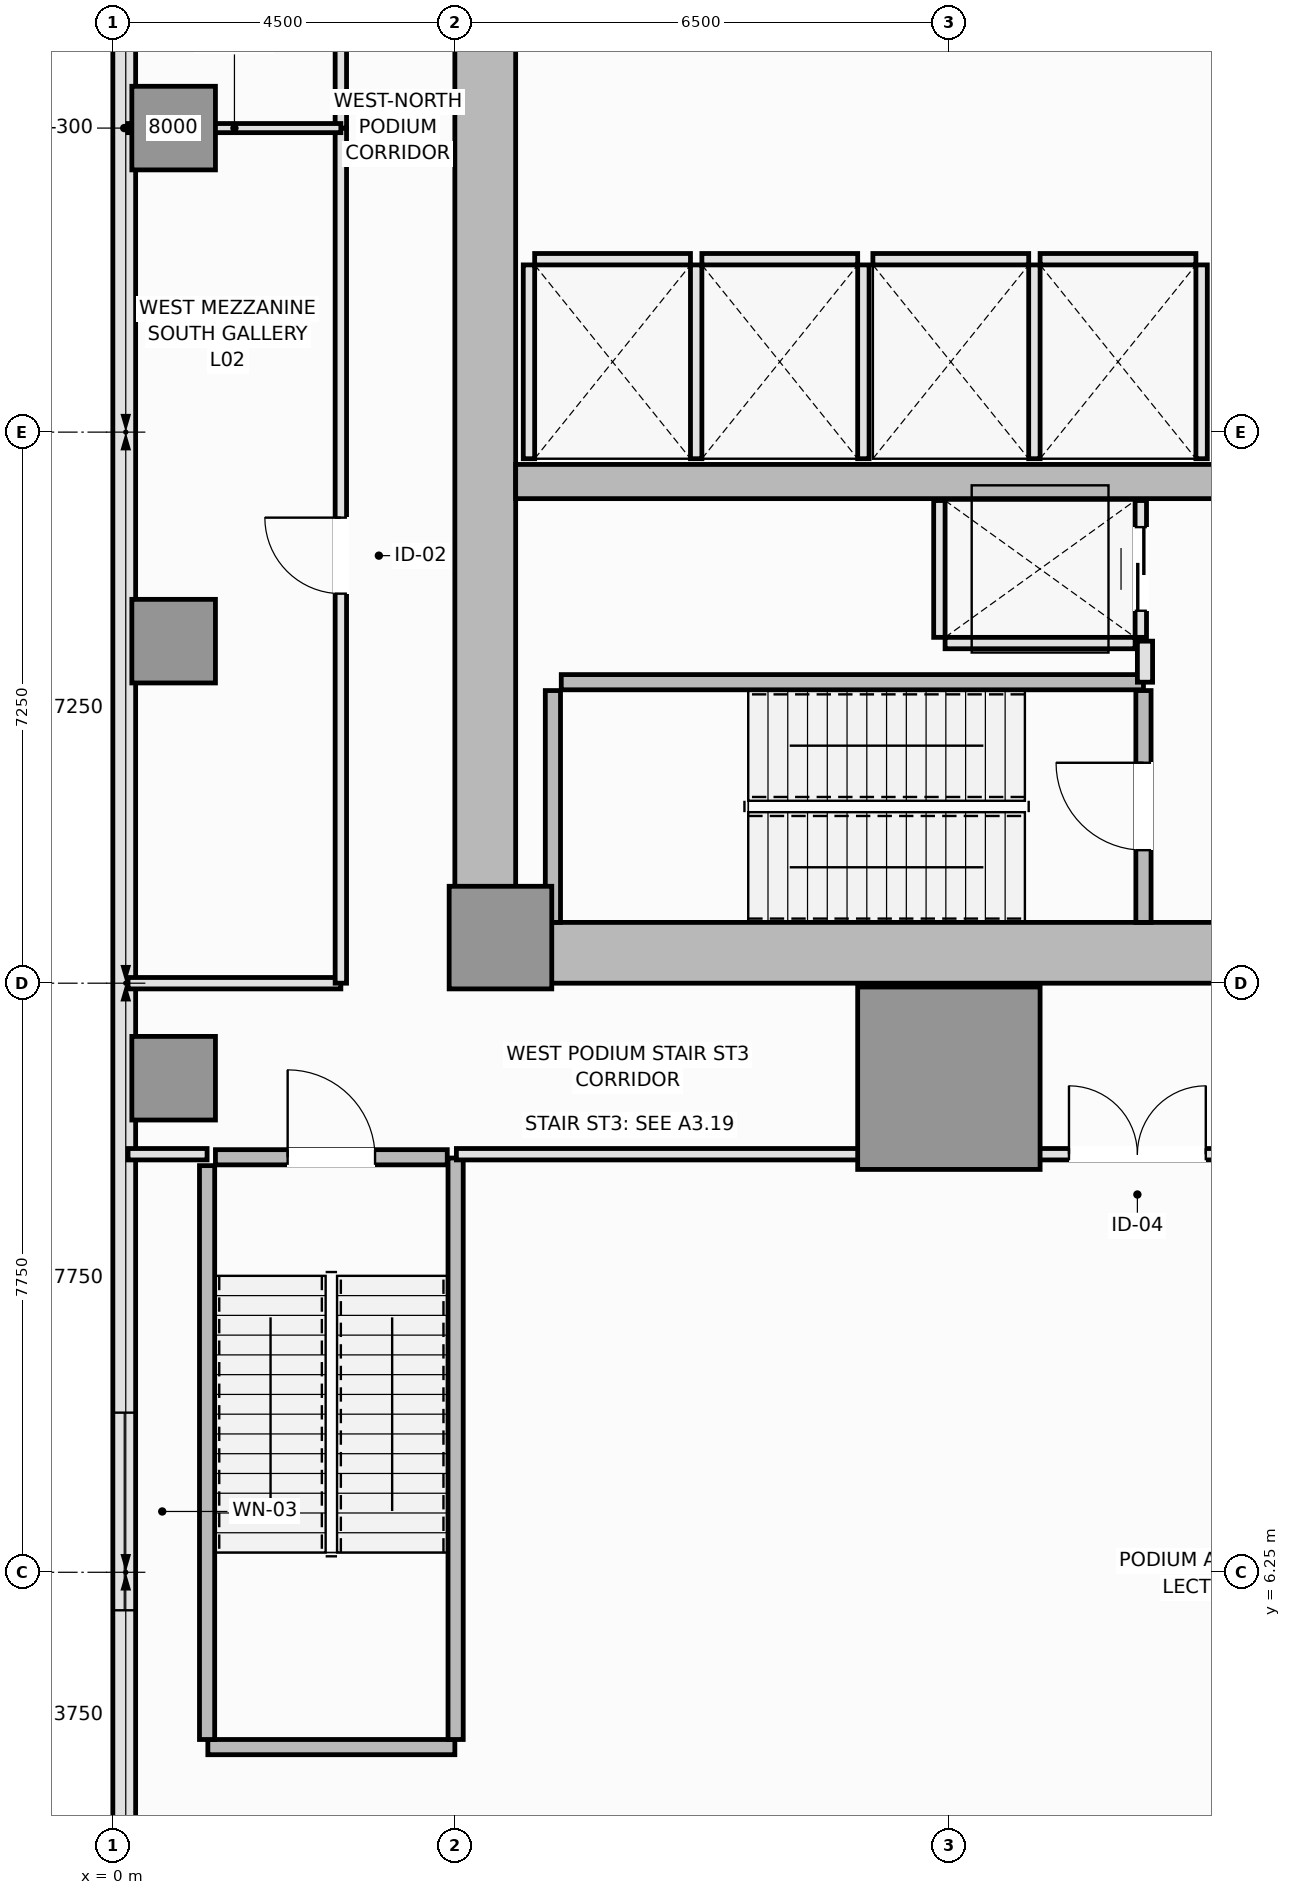
"""IFC4 building model, lengths in metres.
Left out: names, types, materials, properties, quantities, classifications, styles, units other than length and angle.
Written with IfcOpenShell. Run it as: python <this file> out.ifc"""

import sys

from ifc_helpers import new_model, si_unit, direction, frame, frame_2d, origin, origin_2d, place, context, subcontext, project, spatial, rectangle, extrude, element, fill, save


model = new_model("IFC4")
c1 = context("Model", 3, precision=1e-05, world=origin(), true_north=direction((0.0, 1.0)))
c2 = subcontext(c1, "Body", "Model", "MODEL_VIEW")
j1 = project(units=[si_unit("LENGTHUNIT", "METRE"), si_unit("PLANEANGLEUNIT", "RADIAN")], contexts=[c1])
p1 = place(None, origin())
s1 = spatial("IfcSite", under=j1, at=p1, CompositionType="ELEMENT")
p2 = place(p1, origin())
s2 = spatial("IfcBuilding", under=s1, at=p2, CompositionType="ELEMENT")
p3 = place(p2, frame((0.0, 0.0, 10.8)))
s3 = spatial("IfcBuildingStorey", under=s2, at=p3, CompositionType="ELEMENT", Elevation=10.8)
p4 = place(p3, frame((4.5, 14.4, 0.0), z_axis=(0.0, 0.0, 1.0), x_axis=(1.0, 0.0, 0.0)))
e1 = element("IfcWall", 1, at=p4, inside=s3, PredefinedType="SHEAR", context=c2, shape_type="SweptSolid", body=[
    extrude(rectangle(XDim=13.5, YDim=0.8, at=frame_2d((6.75, 0.0))), origin(), (0.0, 0.0, 1.0), 4.8),
])
p5 = place(p3, frame((4.9, 14.8, 0.0), z_axis=(0.0, 0.0, 1.0), x_axis=(0.0, 1.0, 0.0)))
e2 = element("IfcWall", 2, at=p5, inside=s3, PredefinedType="SHEAR", context=c2, shape_type="SweptSolid", body=[
    extrude(rectangle(XDim=20.9, YDim=0.8, at=frame_2d((10.45, 0.0))), origin(), (0.0, 0.0, 1.0), 4.8),
])
p6 = place(p3, frame((5.3, 20.6, 0.0), z_axis=(0.0, 0.0, 1.0), x_axis=(1.0, 0.0, 0.0)))
e3 = element("IfcWall", 3, at=p6, inside=s3, PredefinedType="SHEAR", context=c2, shape_type="SweptSolid", body=[
    extrude(rectangle(XDim=11.9, YDim=0.45, at=frame_2d((5.95, 0.0))), origin(), (0.0, 0.0, 1.0), 4.8),
])
p7 = place(p3, frame((5.1, 14.6, 0.0), z_axis=(0.0, 0.0, 1.0), x_axis=(1.0, 0.0, 0.0)))
e4 = element("IfcColumn", 4, at=p7, inside=s3, PredefinedType="PILASTER", context=c2, shape_type="SweptSolid", body=[
    extrude(rectangle(XDim=1.35, YDim=1.35, at=origin_2d()), origin(), (0.0, 0.0, 1.0), 4.8),
])
p8 = place(p3, frame((11.0, 12.75, 0.0), z_axis=(0.0, 0.0, 1.0), x_axis=(1.0, 0.0, 0.0)))
e5 = element("IfcColumn", 5, at=p8, inside=s3, PredefinedType="COLUMN", context=c2, shape_type="SweptSolid", body=[
    extrude(rectangle(XDim=2.4, YDim=2.4, at=origin_2d()), origin(), (0.0, 0.0, 1.0), 4.8),
])
for number, where, z_axis, x_axis in (
    (6, (0.8, 12.75, 0.0), (0.0, 0.0, 1.0), (1.0, 0.0, 0.0)),
    (7, (0.8, 18.5, 0.0), (0.0, 0.0, 1.0), (1.0, 0.0, 0.0)),
    (8, (0.8, 25.25, 0.0), (0.0, 0.0, 1.0), (1.0, 0.0, 0.0)),
):
    element("IfcColumn", number, at=place(p3, frame(where, z_axis=z_axis, x_axis=x_axis)), inside=s3, PredefinedType="COLUMN", context=c2, shape_type="SweptSolid", body=[
        extrude(rectangle(XDim=1.1, YDim=1.1, at=origin_2d()), origin(), (0.0, 0.0, 1.0), 4.8),
    ])
p9 = place(p3, frame((0.15, 50.35, 0.0), z_axis=(0.0, 0.0, 1.0), x_axis=(0.0, -1.0, 0.0)))
e9 = element("IfcWall", 9, at=p9, inside=s3, PredefinedType="SOLIDWALL", context=c2, shape_type="SweptSolid", body=[
    extrude(rectangle(XDim=50.2, YDim=0.3, at=frame_2d((25.1, 0.0))), origin(), (0.0, 0.0, 1.0), 4.6),
])
p10 = place(p9, frame((6.5, 0.0, 0.9)))
e10 = element("IfcOpeningElement", 10, at=p10, cuts=e9, PredefinedType="OPENING", context=c2, shape_type="SweptSolid", body=[
    extrude(rectangle(XDim=2.6, YDim=2.2, at=frame_2d((1.3, 1.1))), frame((0.0, 0.16, 0.0), z_axis=(0.0, -1.0, 0.0), x_axis=(1.0, 0.0, 0.0)), (0.0, 0.0, 1.0), 0.32),
])
p11 = place(p9, frame((42.0, 0.0, 0.9)))
e11 = element("IfcOpeningElement", 11, at=p11, cuts=e9, PredefinedType="OPENING", context=c2, shape_type="SweptSolid", body=[
    extrude(rectangle(XDim=2.6, YDim=2.2, at=frame_2d((1.3, 1.1))), frame((0.0, 0.16, 0.0), z_axis=(0.0, -1.0, 0.0), x_axis=(1.0, 0.0, 0.0)), (0.0, 0.0, 1.0), 0.32),
])
p12 = place(p3, frame((5.79, 14.8, 0.0), z_axis=(0.0, 0.0, 1.0), x_axis=(0.0, 1.0, 0.0)))
e12 = element("IfcWall", 12, at=p12, inside=s3, PredefinedType="SOLIDWALL", context=c2, shape_type="SweptSolid", body=[
    extrude(rectangle(XDim=3.05, YDim=0.2, at=frame_2d((1.525, 0.0))), origin(), (0.0, 0.0, 1.0), 4.8),
])
p13 = place(p3, frame((5.9, 17.96, 0.0), z_axis=(0.0, 0.0, 1.0), x_axis=(1.0, 0.0, 0.0)))
e13 = element("IfcWall", 13, at=p13, inside=s3, PredefinedType="SOLIDWALL", context=c2, shape_type="SweptSolid", body=[
    extrude(rectangle(XDim=7.66, YDim=0.2, at=frame_2d((3.83, 0.0))), origin(), (0.0, 0.0, 1.0), 4.8),
])
p14 = place(p3, frame((13.56, 14.8, 0.0), z_axis=(0.0, 0.0, 1.0), x_axis=(0.0, 1.0, 0.0)))
e14 = element("IfcWall", 14, at=p14, inside=s3, PredefinedType="SOLIDWALL", context=c2, shape_type="SweptSolid", body=[
    extrude(rectangle(XDim=3.05, YDim=0.2, at=frame_2d((1.525, 0.0))), origin(), (0.0, 0.0, 1.0), 4.8),
])
p15 = place(p14, frame((0.95, 0.0, 0.0)))
e15 = element("IfcOpeningElement", 15, at=p15, cuts=e14, PredefinedType="OPENING", context=c2, shape_type="SweptSolid", body=[
    extrude(rectangle(XDim=1.15, YDim=2.15, at=frame_2d((0.575, 1.075))), frame((0.0, 0.11, 0.0), z_axis=(0.0, -1.0, 0.0), x_axis=(1.0, 0.0, 0.0)), (0.0, 0.0, 1.0), 0.22),
])
p16 = place(p3, frame((1.25, 3.95, 0.0), z_axis=(0.0, 0.0, 1.0), x_axis=(1.0, 0.0, 0.0)))
e16 = element("IfcWall", 16, at=p16, inside=s3, PredefinedType="SOLIDWALL", context=c2, shape_type="SweptSolid", body=[
    extrude(rectangle(XDim=3.25, YDim=0.2, at=frame_2d((1.625, 0.0))), origin(), (0.0, 0.0, 1.0), 4.8),
])
p17 = place(p3, frame((1.24, 4.05, 0.0), z_axis=(0.0, 0.0, 1.0), x_axis=(0.0, 1.0, 0.0)))
e17 = element("IfcWall", 17, at=p17, inside=s3, PredefinedType="SOLIDWALL", context=c2, shape_type="SweptSolid", body=[
    extrude(rectangle(XDim=7.55, YDim=0.2, at=frame_2d((3.775, 0.0))), origin(), (0.0, 0.0, 1.0), 4.8),
])
p18 = place(p3, frame((4.51, 4.05, 0.0), z_axis=(0.0, 0.0, 1.0), x_axis=(0.0, 1.0, 0.0)))
e18 = element("IfcWall", 18, at=p18, inside=s3, PredefinedType="SOLIDWALL", context=c2, shape_type="SweptSolid", body=[
    extrude(rectangle(XDim=7.65, YDim=0.2, at=frame_2d((3.825, 0.0))), origin(), (0.0, 0.0, 1.0), 4.8),
])
p19 = place(p3, frame((1.35, 11.71, 0.0), z_axis=(0.0, 0.0, 1.0), x_axis=(1.0, 0.0, 0.0)))
e19 = element("IfcWall", 19, at=p19, inside=s3, PredefinedType="SOLIDWALL", context=c2, shape_type="SweptSolid", body=[
    extrude(rectangle(XDim=3.05, YDim=0.2, at=frame_2d((1.525, 0.0))), origin(), (0.0, 0.0, 1.0), 4.8),
])
p20 = place(p19, frame((0.95, 0.0, 0.0)))
e20 = element("IfcOpeningElement", 20, at=p20, cuts=e19, PredefinedType="OPENING", context=c2, shape_type="SweptSolid", body=[
    extrude(rectangle(XDim=1.15, YDim=2.15, at=frame_2d((0.575, 1.075))), frame((0.0, 0.11, 0.0), z_axis=(0.0, -1.0, 0.0), x_axis=(1.0, 0.0, 0.0)), (0.0, 0.0, 1.0), 0.22),
])
p21 = place(p3, frame((5.55, 23.525, 0.0), z_axis=(0.0, 0.0, 1.0), x_axis=(1.0, 0.0, 0.0)))
e21 = element("IfcWall", 21, at=p21, inside=s3, PredefinedType="PARTITIONING", context=c2, shape_type="SweptSolid", body=[
    extrude(rectangle(XDim=2.05, YDim=0.15, at=frame_2d((1.025, 0.0))), origin(), (0.0, 0.0, 1.0), 4.6),
])
for number, where, z_axis, x_axis in (
    (22, (5.475, 20.9, 0.0), (0.0, 0.0, 1.0), (0.0, 1.0, 0.0)),
    (23, (7.675, 20.9, 0.0), (0.0, 0.0, 1.0), (0.0, 1.0, 0.0)),
):
    element("IfcWall", number, at=place(p3, frame(where, z_axis=z_axis, x_axis=x_axis)), inside=s3, PredefinedType="PARTITIONING", context=c2, shape_type="SweptSolid", body=[
        extrude(rectangle(XDim=2.55, YDim=0.15, at=frame_2d((1.275, 0.0))), origin(), (0.0, 0.0, 1.0), 4.6),
    ])
p22 = place(p3, frame((7.75, 23.525, 0.0), z_axis=(0.0, 0.0, 1.0), x_axis=(1.0, 0.0, 0.0)))
e24 = element("IfcWall", 24, at=p22, inside=s3, PredefinedType="PARTITIONING", context=c2, shape_type="SweptSolid", body=[
    extrude(rectangle(XDim=2.05, YDim=0.15, at=frame_2d((1.025, 0.0))), origin(), (0.0, 0.0, 1.0), 4.6),
])
p23 = place(p3, frame((9.875, 20.9, 0.0), z_axis=(0.0, 0.0, 1.0), x_axis=(0.0, 1.0, 0.0)))
e25 = element("IfcWall", 25, at=p23, inside=s3, PredefinedType="PARTITIONING", context=c2, shape_type="SweptSolid", body=[
    extrude(rectangle(XDim=2.55, YDim=0.15, at=frame_2d((1.275, 0.0))), origin(), (0.0, 0.0, 1.0), 4.6),
])
p24 = place(p3, frame((10.0, 23.525, 0.0), z_axis=(0.0, 0.0, 1.0), x_axis=(1.0, 0.0, 0.0)))
e26 = element("IfcWall", 26, at=p24, inside=s3, PredefinedType="PARTITIONING", context=c2, shape_type="SweptSolid", body=[
    extrude(rectangle(XDim=2.05, YDim=0.15, at=frame_2d((1.025, 0.0))), origin(), (0.0, 0.0, 1.0), 4.6),
])
p25 = place(p3, frame((12.125, 20.9, 0.0), z_axis=(0.0, 0.0, 1.0), x_axis=(0.0, 1.0, 0.0)))
e27 = element("IfcWall", 27, at=p25, inside=s3, PredefinedType="PARTITIONING", context=c2, shape_type="SweptSolid", body=[
    extrude(rectangle(XDim=2.55, YDim=0.15, at=frame_2d((1.275, 0.0))), origin(), (0.0, 0.0, 1.0), 4.6),
])
p26 = place(p3, frame((12.2, 23.525, 0.0), z_axis=(0.0, 0.0, 1.0), x_axis=(1.0, 0.0, 0.0)))
e28 = element("IfcWall", 28, at=p26, inside=s3, PredefinedType="PARTITIONING", context=c2, shape_type="SweptSolid", body=[
    extrude(rectangle(XDim=2.05, YDim=0.15, at=frame_2d((1.025, 0.0))), origin(), (0.0, 0.0, 1.0), 4.6),
])
p27 = place(p3, frame((14.325, 20.9, 0.0), z_axis=(0.0, 0.0, 1.0), x_axis=(0.0, 1.0, 0.0)))
e29 = element("IfcWall", 29, at=p27, inside=s3, PredefinedType="PARTITIONING", context=c2, shape_type="SweptSolid", body=[
    extrude(rectangle(XDim=2.55, YDim=0.15, at=frame_2d((1.275, 0.0))), origin(), (0.0, 0.0, 1.0), 4.6),
])
p28 = place(p3, frame((10.95, 18.475, 0.0), z_axis=(0.0, 0.0, 1.0), x_axis=(1.0, 0.0, 0.0)))
e30 = element("IfcWall", 30, at=p28, inside=s3, PredefinedType="PARTITIONING", context=c2, shape_type="SweptSolid", body=[
    extrude(rectangle(XDim=2.5, YDim=0.15, at=frame_2d((1.25, 0.0))), origin(), (0.0, 0.0, 1.0), 4.6),
])
p29 = place(p3, frame((10.875, 18.55, 0.0), z_axis=(0.0, 0.0, 1.0), x_axis=(0.0, 1.0, 0.0)))
e31 = element("IfcWall", 31, at=p29, inside=s3, PredefinedType="PARTITIONING", context=c2, shape_type="SweptSolid", body=[
    extrude(rectangle(XDim=1.8, YDim=0.15, at=frame_2d((0.9, 0.0))), origin(), (0.0, 0.0, 1.0), 4.6),
])
p30 = place(p3, frame((13.525, 18.55, 0.0), z_axis=(0.0, 0.0, 1.0), x_axis=(0.0, 1.0, 0.0)))
e32 = element("IfcWall", 32, at=p30, inside=s3, PredefinedType="PARTITIONING", context=c2, shape_type="SweptSolid", body=[
    extrude(rectangle(XDim=1.8, YDim=0.15, at=frame_2d((0.9, 0.0))), origin(), (0.0, 0.0, 1.0), 4.6),
])
p31 = place(p30, frame((0.35, 0.0, 0.0)))
e33 = element("IfcOpeningElement", 33, at=p31, cuts=e32, PredefinedType="OPENING", context=c2, shape_type="SweptSolid", body=[
    extrude(rectangle(XDim=1.1, YDim=2.2, at=frame_2d((0.55, 1.1))), frame((0.0, 0.085, 0.0), z_axis=(0.0, -1.0, 0.0), x_axis=(1.0, 0.0, 0.0)), (0.0, 0.0, 1.0), 0.17),
])
p32 = place(p3, frame((13.58, 17.96, 0.0), z_axis=(0.0, 0.0, 1.0), x_axis=(0.0, 1.0, 0.0)))
e34 = element("IfcWall", 34, at=p32, inside=s3, PredefinedType="PARTITIONING", context=c2, shape_type="SweptSolid", body=[
    extrude(rectangle(XDim=0.54, YDim=0.2, at=frame_2d((0.27, 0.0))), origin(), (0.0, 0.0, 1.0), 4.6),
])
p33 = place(p3, frame((0.2, 11.75, 0.0), z_axis=(0.0, 0.0, 1.0), x_axis=(1.0, 0.0, 0.0)))
e35 = element("IfcWall", 35, at=p33, inside=s3, PredefinedType="PARTITIONING", context=c2, shape_type="SweptSolid", body=[
    extrude(rectangle(XDim=1.04, YDim=0.15, at=frame_2d((0.52, 0.0))), origin(), (0.0, 0.0, 1.0), 4.6),
])
p34 = place(p3, frame((4.52, 11.75, 0.0), z_axis=(0.0, 0.0, 1.0), x_axis=(1.0, 0.0, 0.0)))
e36 = element("IfcWall", 36, at=p34, inside=s3, PredefinedType="PARTITIONING", context=c2, shape_type="SweptSolid", body=[
    extrude(rectangle(XDim=16.73, YDim=0.15, at=frame_2d((8.365, 0.0))), origin(), (0.0, 0.0, 1.0), 4.6),
])
p35 = place(p34, frame((8.06, 0.0, 0.0)))
e37 = element("IfcOpeningElement", 37, at=p35, cuts=e36, PredefinedType="OPENING", context=c2, shape_type="SweptSolid", body=[
    extrude(rectangle(XDim=1.8, YDim=2.2, at=frame_2d((0.9, 1.1))), frame((0.0, 0.085, 0.0), z_axis=(0.0, -1.0, 0.0), x_axis=(1.0, 0.0, 0.0)), (0.0, 0.0, 1.0), 0.17),
])
p36 = place(p3, frame((0.2, 14.0, 0.0), z_axis=(0.0, 0.0, 1.0), x_axis=(1.0, 0.0, 0.0)))
e38 = element("IfcWall", 38, at=p36, inside=s3, PredefinedType="PARTITIONING", context=c2, shape_type="SweptSolid", body=[
    extrude(rectangle(XDim=2.8, YDim=0.15, at=frame_2d((1.4, 0.0))), origin(), (0.0, 0.0, 1.0), 4.6),
])
p37 = place(p3, frame((3.0, 14.0, 0.0), z_axis=(0.0, 0.0, 1.0), x_axis=(0.0, 1.0, 0.0)))
e39 = element("IfcWall", 39, at=p37, inside=s3, PredefinedType="PARTITIONING", context=c2, shape_type="SweptSolid", body=[
    extrude(rectangle(XDim=11.25, YDim=0.15, at=frame_2d((5.625, 0.0))), origin(), (0.0, 0.0, 1.0), 4.6),
])
p38 = place(p37, frame((5.125, 0.0, 0.0)))
e40 = element("IfcOpeningElement", 40, at=p38, cuts=e39, PredefinedType="OPENING", context=c2, shape_type="SweptSolid", body=[
    extrude(rectangle(XDim=1.0, YDim=2.15, at=frame_2d((0.5, 1.075))), frame((0.0, 0.085, 0.0), z_axis=(0.0, -1.0, 0.0), x_axis=(1.0, 0.0, 0.0)), (0.0, 0.0, 1.0), 0.17),
])
p39 = place(p3, frame((3.0, 25.25, 0.0), z_axis=(0.0, 0.0, 1.0), x_axis=(0.0, 1.0, 0.0)))
e41 = element("IfcWall", 41, at=p39, inside=s3, PredefinedType="PARTITIONING", context=c2, shape_type="SweptSolid", body=[
    extrude(rectangle(XDim=11.25, YDim=0.15, at=frame_2d((5.625, 0.0))), origin(), (0.0, 0.0, 1.0), 4.6),
])
p40 = place(p39, frame((5.125, 0.0, 0.0)))
e42 = element("IfcOpeningElement", 42, at=p40, cuts=e41, PredefinedType="OPENING", context=c2, shape_type="SweptSolid", body=[
    extrude(rectangle(XDim=1.0, YDim=2.15, at=frame_2d((0.5, 1.075))), frame((0.0, 0.085, 0.0), z_axis=(0.0, -1.0, 0.0), x_axis=(1.0, 0.0, 0.0)), (0.0, 0.0, 1.0), 0.17),
])
p41 = place(p3, frame((0.2, 25.25, 0.0), z_axis=(0.0, 0.0, 1.0), x_axis=(1.0, 0.0, 0.0)))
e43 = element("IfcWall", 43, at=p41, inside=s3, PredefinedType="PARTITIONING", context=c2, shape_type="SweptSolid", body=[
    extrude(rectangle(XDim=2.8, YDim=0.12, at=frame_2d((1.4, 0.0))), origin(), (0.0, 0.0, 1.0), 3.8),
])
p42 = place(p11, origin())
e44 = element("IfcWindow", 44, at=p42, inside=s3, PartitioningType="SINGLE_PANEL", PredefinedType="WINDOW", context=c2, shape_type="SweptSolid", body=[
    extrude(rectangle(XDim=2.6, YDim=2.2, at=frame_2d((1.3, 1.1))), frame((0.0, 0.03, 0.0), z_axis=(0.0, -1.0, 0.0), x_axis=(1.0, 0.0, 0.0)), (0.0, 0.0, 1.0), 0.06),
])
fill(e11, e44)
p43 = place(p15, origin())
e45 = element("IfcDoor", 45, at=p43, inside=s3, OperationType="SINGLE_SWING_RIGHT", PredefinedType="DOOR", context=c2, shape_type="SweptSolid", body=[
    extrude(rectangle(XDim=1.15, YDim=2.15, at=frame_2d((0.575, 1.075))), frame((0.0, 0.025, 0.0), z_axis=(0.0, -1.0, 0.0), x_axis=(1.0, 0.0, 0.0)), (0.0, 0.0, 1.0), 0.05),
])
fill(e15, e45)
p44 = place(p20, origin())
e46 = element("IfcDoor", 46, at=p44, inside=s3, OperationType="SINGLE_SWING_LEFT", PredefinedType="DOOR", context=c2, shape_type="SweptSolid", body=[
    extrude(rectangle(XDim=1.15, YDim=2.15, at=frame_2d((0.575, 1.075))), frame((0.0, 0.025, 0.0), z_axis=(0.0, -1.0, 0.0), x_axis=(1.0, 0.0, 0.0)), (0.0, 0.0, 1.0), 0.05),
])
fill(e20, e46)
p45 = place(p31, origin())
e47 = element("IfcDoor", 47, at=p45, inside=s3, OperationType="DOUBLE_DOOR_SLIDING", PredefinedType="DOOR", context=c2, shape_type="SweptSolid", body=[
    extrude(rectangle(XDim=1.1, YDim=2.2, at=frame_2d((0.55, 1.1))), frame((0.0, 0.025, 0.0), z_axis=(0.0, -1.0, 0.0), x_axis=(1.0, 0.0, 0.0)), (0.0, 0.0, 1.0), 0.05),
])
fill(e33, e47)
p46 = place(p35, origin())
e48 = element("IfcDoor", 48, at=p46, inside=s3, OperationType="DOUBLE_DOOR_SINGLE_SWING", PredefinedType="DOOR", context=c2, shape_type="SweptSolid", body=[
    extrude(rectangle(XDim=1.8, YDim=2.2, at=frame_2d((0.9, 1.1))), frame((0.0, 0.025, 0.0), z_axis=(0.0, -1.0, 0.0), x_axis=(1.0, 0.0, 0.0)), (0.0, 0.0, 1.0), 0.05),
])
fill(e37, e48)
p47 = place(p38, origin())
e49 = element("IfcDoor", 49, at=p47, inside=s3, OperationType="SINGLE_SWING_RIGHT", PredefinedType="DOOR", context=c2, shape_type="SweptSolid", body=[
    extrude(rectangle(XDim=1.0, YDim=2.15, at=frame_2d((0.5, 1.075))), frame((0.0, 0.025, 0.0), z_axis=(0.0, -1.0, 0.0), x_axis=(1.0, 0.0, 0.0)), (0.0, 0.0, 1.0), 0.05),
])
fill(e40, e49)
save(model, sys.argv[1])
